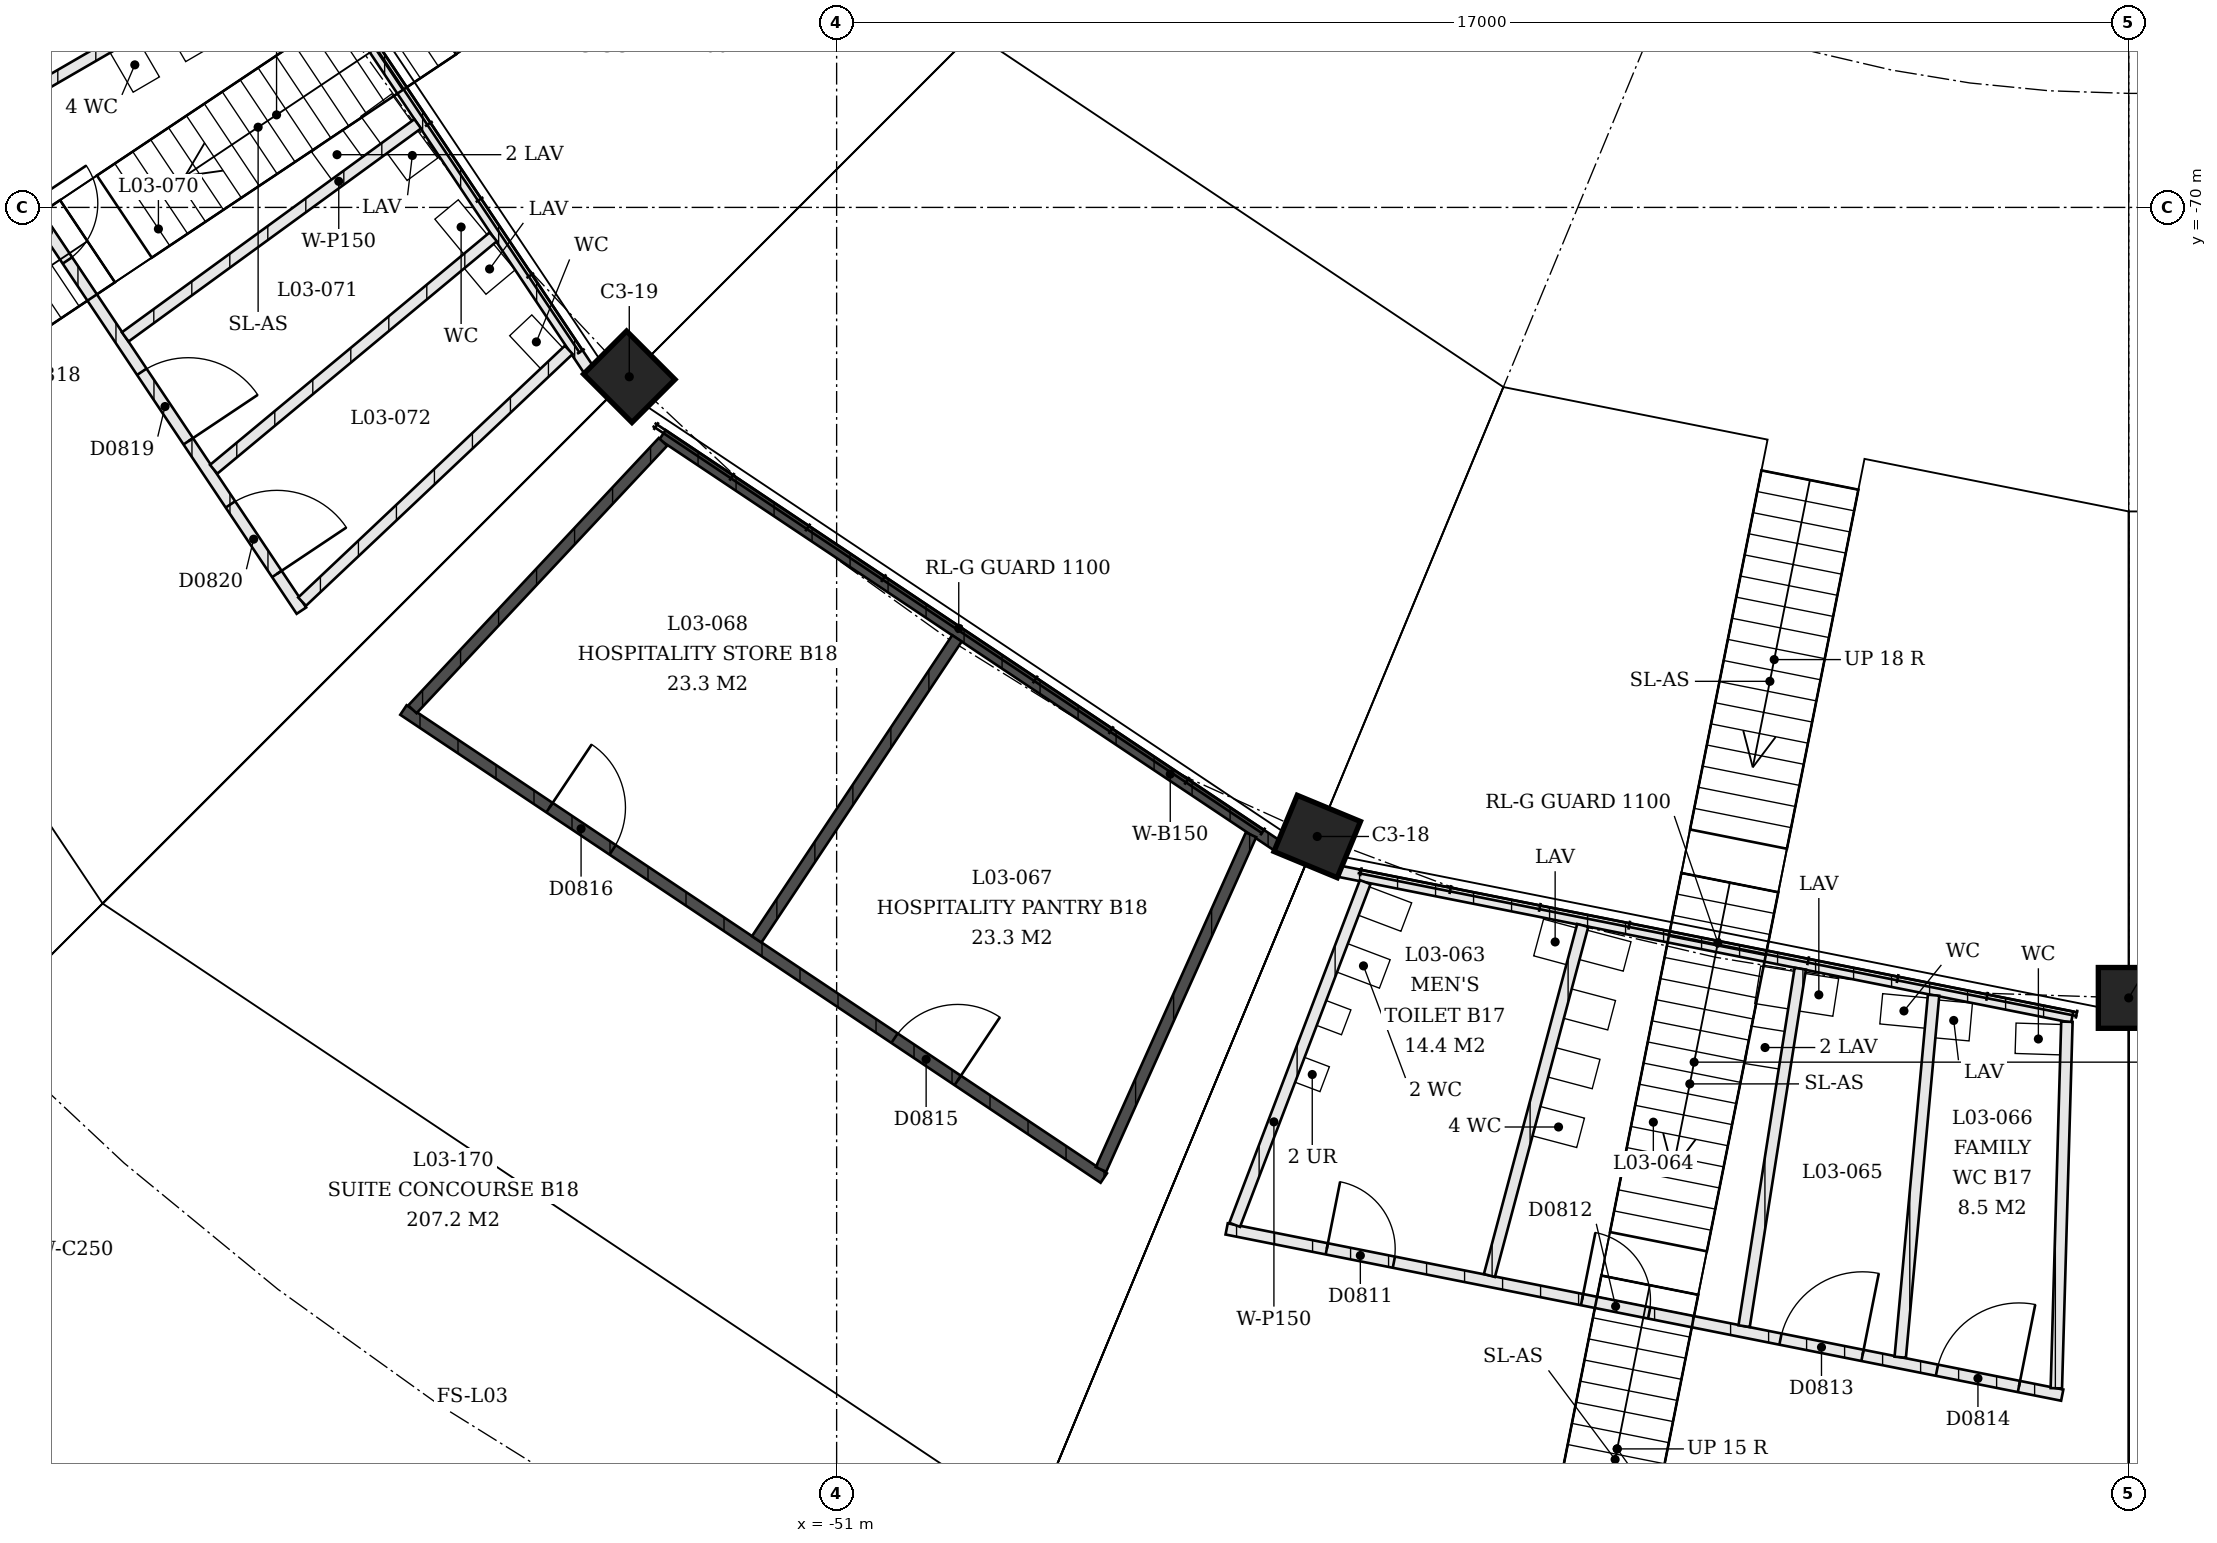
"""IFC4 building model, lengths in metres.
Left out: names, types, materials, properties, quantities, classifications, styles, units other than length and angle.
Written with IfcOpenShell. Run it as: python <this file> out.ifc"""

import sys

from ifc_helpers import new_model, si_unit, direction, frame, frame_2d, origin, origin_2d, place, context, subcontext, project, spatial, rectangle, extrude, element, fill, save


model = new_model("IFC4")
c1 = context("Model", 3, precision=1e-05, world=origin(), true_north=direction((0.0, 1.0)))
c2 = subcontext(c1, "Body", "Model", "MODEL_VIEW")
j1 = project(units=[si_unit("LENGTHUNIT", "METRE"), si_unit("PLANEANGLEUNIT", "RADIAN")], contexts=[c1])
p1 = place(None, origin())
s1 = spatial("IfcSite", under=j1, at=p1, CompositionType="ELEMENT")
p2 = place(p1, origin())
s2 = spatial("IfcBuilding", under=s1, at=p2, CompositionType="ELEMENT")
p3 = place(p2, frame((0.0, 0.0, 13.5)))
s3 = spatial("IfcBuildingStorey", under=s2, at=p3, CompositionType="ELEMENT", Elevation=13.5)
p4 = place(p3, frame((-34.0, -80.4, 0.0), z_axis=(0.0, 0.0, 1.0), x_axis=(1.0, 0.0, 0.0)))
e1 = element("IfcColumn", 1, at=p4, inside=s3, PredefinedType="COLUMN", context=c2, shape_type="SweptSolid", body=[
    extrude(rectangle(XDim=0.8, YDim=0.8, at=origin_2d()), origin(), (0.0, 0.0, 1.0), 2.033),
])
for number, where, z_axis, x_axis in (
    (2, (-44.677, -78.276, 0.0), (0.0, 0.0, 1.0), (0.924, -0.383, 0.0)),
    (3, (-53.728, -72.228, 0.0), (0.0, 0.0, 1.0), (0.707, -0.707, 0.0)),
):
    element("IfcColumn", number, at=place(p3, frame(where, z_axis=z_axis, x_axis=x_axis)), inside=s3, PredefinedType="COLUMN", context=c2, shape_type="SweptSolid", body=[
        extrude(rectangle(XDim=0.9, YDim=0.8, at=origin_2d()), origin(), (0.0, 0.0, 1.0), 2.033),
    ])
p5 = place(p3, frame((-44.38, -78.735, 0.0), z_axis=(0.0, 0.0, 1.0), x_axis=(0.980786564352, -0.19508386706, 0.0)))
e4 = element("IfcWall", 4, at=p5, inside=s3, PredefinedType="PARTITIONING", context=c2, shape_type="SweptSolid", body=[
    extrude(rectangle(XDim=9.825, YDim=0.15, at=frame_2d((4.913, 0.0))), origin(), (0.0, 0.0, 1.0), 3.0),
])
p6 = place(p3, frame((-45.869, -83.439, 0.0), z_axis=(0.0, 0.0, 1.0), x_axis=(0.980786208969, -0.195085653744, 0.0)))
e5 = element("IfcWall", 5, at=p6, inside=s3, PredefinedType="PARTITIONING", context=c2, shape_type="SweptSolid", body=[
    extrude(rectangle(XDim=11.209, YDim=0.15, at=frame_2d((5.604, 0.0))), origin(), (0.0, 0.0, 1.0), 3.0),
])
p7 = place(p6, frame((1.343, 0.0, 0.0)))
e6 = element("IfcOpeningElement", 6, at=p7, cuts=e5, PredefinedType="OPENING", context=c2, shape_type="SweptSolid", body=[
    extrude(rectangle(XDim=0.9, YDim=2.1, at=frame_2d((0.45, 1.05))), frame((0.0, 0.075, 0.0), z_axis=(0.0, -1.0, 0.0), x_axis=(1.0, 0.0, 0.0)), (0.0, 0.0, 1.0), 0.15),
])
p8 = place(p6, frame((4.768, 0.0, 0.0)))
e7 = element("IfcOpeningElement", 7, at=p8, cuts=e5, PredefinedType="OPENING", context=c2, shape_type="SweptSolid", body=[
    extrude(rectangle(XDim=0.9, YDim=2.1, at=frame_2d((0.45, 1.05))), frame((0.0, 0.075, 0.0), z_axis=(0.0, -1.0, 0.0), x_axis=(1.0, 0.0, 0.0)), (0.0, 0.0, 1.0), 0.15),
])
p9 = place(p6, frame((7.43, 0.0, 0.0)))
e8 = element("IfcOpeningElement", 8, at=p9, cuts=e5, PredefinedType="OPENING", context=c2, shape_type="SweptSolid", body=[
    extrude(rectangle(XDim=1.1, YDim=2.1, at=frame_2d((0.55, 1.05))), frame((0.0, 0.075, 0.0), z_axis=(0.0, -1.0, 0.0), x_axis=(1.0, 0.0, 0.0)), (0.0, 0.0, 1.0), 0.15),
])
p10 = place(p6, frame((9.529, 0.0, 0.0)))
e9 = element("IfcOpeningElement", 9, at=p10, cuts=e5, PredefinedType="OPENING", context=c2, shape_type="SweptSolid", body=[
    extrude(rectangle(XDim=1.1, YDim=2.1, at=frame_2d((0.55, 1.05))), frame((0.0, 0.075, 0.0), z_axis=(0.0, -1.0, 0.0), x_axis=(1.0, 0.0, 0.0)), (0.0, 0.0, 1.0), 0.15),
])
p11 = place(p3, frame((-44.045, -78.877, 0.0), z_axis=(0.0, 0.0, 1.0), x_axis=(-0.355921670207, -0.934515791561, 0.0)))
e10 = element("IfcWall", 10, at=p11, inside=s3, PredefinedType="PARTITIONING", context=c2, shape_type="SweptSolid", body=[
    extrude(rectangle(XDim=4.824, YDim=0.15, at=frame_2d((2.412, 0.0))), origin(), (0.0, 0.0, 1.0), 3.0),
])
p12 = place(p3, frame((-41.183, -79.446, 0.0), z_axis=(0.0, 0.0, 1.0), x_axis=(-0.257618021969, -0.966246839455, 0.0)))
e11 = element("IfcWall", 11, at=p12, inside=s3, PredefinedType="PARTITIONING", context=c2, shape_type="SweptSolid", body=[
    extrude(rectangle(XDim=4.767, YDim=0.15, at=frame_2d((2.383, 0.0))), origin(), (0.0, 0.0, 1.0), 3.0),
])
p13 = place(p3, frame((-38.322, -80.015, 0.0), z_axis=(0.0, 0.0, 1.0), x_axis=(-0.155127731688, -0.987894420908, 0.0)))
e12 = element("IfcWall", 12, at=p13, inside=s3, PredefinedType="PARTITIONING", context=c2, shape_type="SweptSolid", body=[
    extrude(rectangle(XDim=4.761, YDim=0.15, at=frame_2d((2.38, 0.0))), origin(), (0.0, 0.0, 1.0), 3.0),
])
p14 = place(p3, frame((-36.567, -80.364, 0.0), z_axis=(0.0, 0.0, 1.0), x_axis=(-0.091727705385, -0.995784127241, 0.0)))
e13 = element("IfcWall", 13, at=p14, inside=s3, PredefinedType="PARTITIONING", context=c2, shape_type="SweptSolid", body=[
    extrude(rectangle(XDim=4.783, YDim=0.15, at=frame_2d((2.392, 0.0))), origin(), (0.0, 0.0, 1.0), 3.0),
])
p15 = place(p3, frame((-34.813, -80.713, 0.0), z_axis=(0.0, 0.0, 1.0), x_axis=(-0.028793807365, -0.999585372371, 0.0)))
e14 = element("IfcWall", 14, at=p15, inside=s3, PredefinedType="PARTITIONING", context=c2, shape_type="SweptSolid", body=[
    extrude(rectangle(XDim=4.824, YDim=0.15, at=frame_2d((2.412, 0.0))), origin(), (0.0, 0.0, 1.0), 3.0),
])
p16 = place(p3, frame((-45.211, -78.391, 0.0), z_axis=(0.0, 0.0, 1.0), x_axis=(-0.831470078842, 0.555569534793, 0.0)))
e15 = element("IfcWall", 15, at=p16, inside=s3, PredefinedType="SOLIDWALL", context=c2, shape_type="SweptSolid", body=[
    extrude(rectangle(XDim=9.718, YDim=0.15, at=frame_2d((4.859, 0.0))), origin(), (0.0, 0.0, 1.0), 3.0),
])
p17 = place(p3, frame((-47.485, -82.77, 0.0), z_axis=(0.0, 0.0, 1.0), x_axis=(-0.831470287315, 0.555569222791, 0.0)))
e16 = element("IfcWall", 16, at=p17, inside=s3, PredefinedType="SOLIDWALL", context=c2, shape_type="SweptSolid", body=[
    extrude(rectangle(XDim=11.082, YDim=0.15, at=frame_2d((5.541, 0.0))), origin(), (0.0, 0.0, 1.0), 3.0),
])
p18 = place(p17, frame((2.311, 0.0, 0.0)))
e17 = element("IfcOpeningElement", 17, at=p18, cuts=e16, PredefinedType="OPENING", context=c2, shape_type="SweptSolid", body=[
    extrude(rectangle(XDim=1.0, YDim=2.1, at=frame_2d((0.5, 1.05))), frame((0.0, 0.075, 0.0), z_axis=(0.0, -1.0, 0.0), x_axis=(1.0, 0.0, 0.0)), (0.0, 0.0, 1.0), 0.15),
])
p19 = place(p17, frame((7.771, 0.0, 0.0)))
e18 = element("IfcOpeningElement", 18, at=p19, cuts=e16, PredefinedType="OPENING", context=c2, shape_type="SweptSolid", body=[
    extrude(rectangle(XDim=1.0, YDim=2.1, at=frame_2d((0.5, 1.05))), frame((0.0, 0.075, 0.0), z_axis=(0.0, -1.0, 0.0), x_axis=(1.0, 0.0, 0.0)), (0.0, 0.0, 1.0), 0.15),
])
p20 = place(p3, frame((-45.548, -78.254, 0.0), z_axis=(0.0, 0.0, 1.0), x_axis=(-0.409145990025, -0.912468935825, 0.0)))
e19 = element("IfcWall", 19, at=p20, inside=s3, PredefinedType="SOLIDWALL", context=c2, shape_type="SweptSolid", body=[
    extrude(rectangle(XDim=4.824, YDim=0.15, at=frame_2d((2.412, 0.0))), origin(), (0.0, 0.0, 1.0), 3.0),
])
p21 = place(p3, frame((-49.417, -75.67, 0.0), z_axis=(0.0, 0.0, 1.0), x_axis=(-0.553989356348, -0.832523749243, 0.0)))
e20 = element("IfcWall", 20, at=p21, inside=s3, PredefinedType="SOLIDWALL", context=c2, shape_type="SweptSolid", body=[
    extrude(rectangle(XDim=4.757, YDim=0.15, at=frame_2d((2.378, 0.0))), origin(), (0.0, 0.0, 1.0), 3.0),
])
p22 = place(p3, frame((-53.285, -73.085, 0.0), z_axis=(0.0, 0.0, 1.0), x_axis=(-0.68366483381, -0.729796132499, 0.0)))
e21 = element("IfcWall", 21, at=p22, inside=s3, PredefinedType="SOLIDWALL", context=c2, shape_type="SweptSolid", body=[
    extrude(rectangle(XDim=4.821, YDim=0.15, at=frame_2d((2.411, 0.0))), origin(), (0.0, 0.0, 1.0), 3.0),
])
p23 = place(p3, frame((-59.891, -63.711, 0.0), z_axis=(0.0, 0.0, 1.0), x_axis=(0.555562437394, -0.83147482112, 0.0)))
e22 = element("IfcWall", 22, at=p23, inside=s3, PredefinedType="PARTITIONING", context=c2, shape_type="SweptSolid", body=[
    extrude(rectangle(XDim=10.125, YDim=0.15, at=frame_2d((5.062, 0.0))), origin(), (0.0, 0.0, 1.0), 3.0),
])
p24 = place(p3, frame((-64.27, -65.985, 0.0), z_axis=(0.0, 0.0, 1.0), x_axis=(0.555569460176, -0.8314701287, 0.0)))
e23 = element("IfcWall", 23, at=p24, inside=s3, PredefinedType="PARTITIONING", context=c2, shape_type="SweptSolid", body=[
    extrude(rectangle(XDim=11.209, YDim=0.15, at=frame_2d((5.604, 0.0))), origin(), (0.0, 0.0, 1.0), 3.0),
])
p25 = place(p24, frame((1.343, 0.0, 0.0)))
e24 = element("IfcOpeningElement", 24, at=p25, cuts=e23, PredefinedType="OPENING", context=c2, shape_type="SweptSolid", body=[
    extrude(rectangle(XDim=0.9, YDim=2.1, at=frame_2d((0.45, 1.05))), frame((0.0, 0.075, 0.0), z_axis=(0.0, -1.0, 0.0), x_axis=(1.0, 0.0, 0.0)), (0.0, 0.0, 1.0), 0.15),
])
p26 = place(p24, frame((4.768, 0.0, 0.0)))
e25 = element("IfcOpeningElement", 25, at=p26, cuts=e23, PredefinedType="OPENING", context=c2, shape_type="SweptSolid", body=[
    extrude(rectangle(XDim=0.9, YDim=2.1, at=frame_2d((0.45, 1.05))), frame((0.0, 0.075, 0.0), z_axis=(0.0, -1.0, 0.0), x_axis=(1.0, 0.0, 0.0)), (0.0, 0.0, 1.0), 0.15),
])
p27 = place(p24, frame((7.43, 0.0, 0.0)))
e26 = element("IfcOpeningElement", 26, at=p27, cuts=e23, PredefinedType="OPENING", context=c2, shape_type="SweptSolid", body=[
    extrude(rectangle(XDim=1.1, YDim=2.1, at=frame_2d((0.55, 1.05))), frame((0.0, 0.075, 0.0), z_axis=(0.0, -1.0, 0.0), x_axis=(1.0, 0.0, 0.0)), (0.0, 0.0, 1.0), 0.15),
])
p28 = place(p24, frame((9.529, 0.0, 0.0)))
e27 = element("IfcOpeningElement", 27, at=p28, cuts=e23, PredefinedType="OPENING", context=c2, shape_type="SweptSolid", body=[
    extrude(rectangle(XDim=1.1, YDim=2.1, at=frame_2d((0.55, 1.05))), frame((0.0, 0.075, 0.0), z_axis=(0.0, -1.0, 0.0), x_axis=(1.0, 0.0, 0.0)), (0.0, 0.0, 1.0), 0.15),
])
p29 = place(p3, frame((-58.133, -66.474, 0.0), z_axis=(0.0, 0.0, 1.0), x_axis=(-0.865401737421, -0.501078669341, 0.0)))
e28 = element("IfcWall", 28, at=p29, inside=s3, PredefinedType="PARTITIONING", context=c2, shape_type="SweptSolid", body=[
    extrude(rectangle(XDim=4.767, YDim=0.15, at=frame_2d((2.383, 0.0))), origin(), (0.0, 0.0, 1.0), 3.0),
])
p30 = place(p3, frame((-56.512, -68.901, 0.0), z_axis=(0.0, 0.0, 1.0), x_axis=(-0.808261251336, -0.588824039581, 0.0)))
e29 = element("IfcWall", 29, at=p30, inside=s3, PredefinedType="PARTITIONING", context=c2, shape_type="SweptSolid", body=[
    extrude(rectangle(XDim=4.761, YDim=0.15, at=frame_2d((2.38, 0.0))), origin(), (0.0, 0.0, 1.0), 3.0),
])
p31 = place(p3, frame((-55.518, -70.388, 0.0), z_axis=(0.0, 0.0, 1.0), x_axis=(-0.769023985067, -0.639219923337, 0.0)))
e30 = element("IfcWall", 30, at=p31, inside=s3, PredefinedType="PARTITIONING", context=c2, shape_type="SweptSolid", body=[
    extrude(rectangle(XDim=4.783, YDim=0.15, at=frame_2d((2.392, 0.0))), origin(), (0.0, 0.0, 1.0), 3.0),
])
p32 = place(p3, frame((-54.525, -71.875, 0.0), z_axis=(0.0, 0.0, 1.0), x_axis=(-0.727182951144, -0.686443701672, 0.0)))
e31 = element("IfcWall", 31, at=p32, inside=s3, PredefinedType="PARTITIONING", context=c2, shape_type="SweptSolid", body=[
    extrude(rectangle(XDim=4.824, YDim=0.15, at=frame_2d((2.412, 0.0))), origin(), (0.0, 0.0, 1.0), 3.0),
])
p33 = place(p7, origin())
e32 = element("IfcDoor", 32, at=p33, inside=s3, OperationType="SINGLE_SWING_RIGHT", PredefinedType="DOOR", context=c2, shape_type="SweptSolid", body=[
    extrude(rectangle(XDim=0.9, YDim=2.1, at=frame_2d((0.45, 1.05))), frame((0.0, 0.025, 0.0), z_axis=(0.0, -1.0, 0.0), x_axis=(1.0, 0.0, 0.0)), (0.0, 0.0, 1.0), 0.05),
])
fill(e6, e32)
p34 = place(p8, origin())
e33 = element("IfcDoor", 33, at=p34, inside=s3, OperationType="SINGLE_SWING_RIGHT", PredefinedType="DOOR", context=c2, shape_type="SweptSolid", body=[
    extrude(rectangle(XDim=0.9, YDim=2.1, at=frame_2d((0.45, 1.05))), frame((0.0, 0.025, 0.0), z_axis=(0.0, -1.0, 0.0), x_axis=(1.0, 0.0, 0.0)), (0.0, 0.0, 1.0), 0.05),
])
fill(e7, e33)
p35 = place(p9, origin())
e34 = element("IfcDoor", 34, at=p35, inside=s3, OperationType="SINGLE_SWING_LEFT", PredefinedType="DOOR", context=c2, shape_type="SweptSolid", body=[
    extrude(rectangle(XDim=1.1, YDim=2.1, at=frame_2d((0.55, 1.05))), frame((0.0, 0.025, 0.0), z_axis=(0.0, -1.0, 0.0), x_axis=(1.0, 0.0, 0.0)), (0.0, 0.0, 1.0), 0.05),
])
fill(e8, e34)
p36 = place(p10, origin())
e35 = element("IfcDoor", 35, at=p36, inside=s3, OperationType="SINGLE_SWING_LEFT", PredefinedType="DOOR", context=c2, shape_type="SweptSolid", body=[
    extrude(rectangle(XDim=1.1, YDim=2.1, at=frame_2d((0.55, 1.05))), frame((0.0, 0.025, 0.0), z_axis=(0.0, -1.0, 0.0), x_axis=(1.0, 0.0, 0.0)), (0.0, 0.0, 1.0), 0.05),
])
fill(e9, e35)
p37 = place(p18, origin())
e36 = element("IfcDoor", 36, at=p37, inside=s3, OperationType="SINGLE_SWING_LEFT", PredefinedType="DOOR", context=c2, shape_type="SweptSolid", body=[
    extrude(rectangle(XDim=1.0, YDim=2.1, at=frame_2d((0.5, 1.05))), frame((0.0, 0.025, 0.0), z_axis=(0.0, -1.0, 0.0), x_axis=(1.0, 0.0, 0.0)), (0.0, 0.0, 1.0), 0.05),
])
fill(e17, e36)
p38 = place(p19, origin())
e37 = element("IfcDoor", 37, at=p38, inside=s3, OperationType="SINGLE_SWING_RIGHT", PredefinedType="DOOR", context=c2, shape_type="SweptSolid", body=[
    extrude(rectangle(XDim=1.0, YDim=2.1, at=frame_2d((0.5, 1.05))), frame((0.0, 0.025, 0.0), z_axis=(0.0, -1.0, 0.0), x_axis=(1.0, 0.0, 0.0)), (0.0, 0.0, 1.0), 0.05),
])
fill(e18, e37)
p39 = place(p26, origin())
e38 = element("IfcDoor", 38, at=p39, inside=s3, OperationType="SINGLE_SWING_RIGHT", PredefinedType="DOOR", context=c2, shape_type="SweptSolid", body=[
    extrude(rectangle(XDim=0.9, YDim=2.1, at=frame_2d((0.45, 1.05))), frame((0.0, 0.025, 0.0), z_axis=(0.0, -1.0, 0.0), x_axis=(1.0, 0.0, 0.0)), (0.0, 0.0, 1.0), 0.05),
])
fill(e25, e38)
p40 = place(p27, origin())
e39 = element("IfcDoor", 39, at=p40, inside=s3, OperationType="SINGLE_SWING_LEFT", PredefinedType="DOOR", context=c2, shape_type="SweptSolid", body=[
    extrude(rectangle(XDim=1.1, YDim=2.1, at=frame_2d((0.55, 1.05))), frame((0.0, 0.025, 0.0), z_axis=(0.0, -1.0, 0.0), x_axis=(1.0, 0.0, 0.0)), (0.0, 0.0, 1.0), 0.05),
])
fill(e26, e39)
p41 = place(p28, origin())
e40 = element("IfcDoor", 40, at=p41, inside=s3, OperationType="SINGLE_SWING_LEFT", PredefinedType="DOOR", context=c2, shape_type="SweptSolid", body=[
    extrude(rectangle(XDim=1.1, YDim=2.1, at=frame_2d((0.55, 1.05))), frame((0.0, 0.025, 0.0), z_axis=(0.0, -1.0, 0.0), x_axis=(1.0, 0.0, 0.0)), (0.0, 0.0, 1.0), 0.05),
])
fill(e27, e40)
save(model, sys.argv[1])
